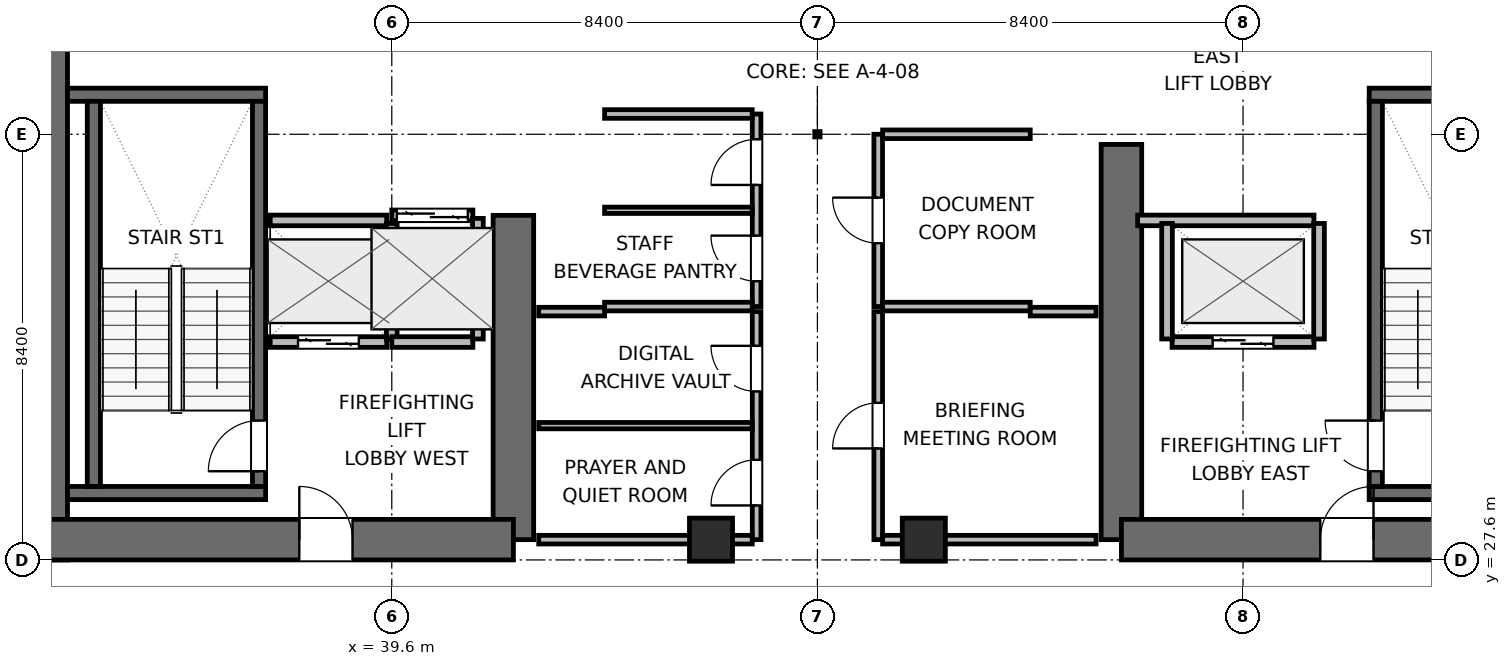
"""IFC4 building model, lengths in metres.
Left out: names, types, materials, properties, quantities, classifications, styles, units other than length and angle.
Written with IfcOpenShell. Run it as: python <this file> out.ifc"""

import sys

from ifc_helpers import new_model, si_unit, direction, frame, frame_2d, origin, origin_2d, place, context, subcontext, project, spatial, rectangle, extrude, element, fill, save


model = new_model("IFC4")
c1 = context("Model", 3, precision=1e-05, world=origin(), true_north=direction((0.0, 1.0)))
c2 = subcontext(c1, "Body", "Model", "MODEL_VIEW")
j1 = project(units=[si_unit("LENGTHUNIT", "METRE"), si_unit("PLANEANGLEUNIT", "RADIAN")], contexts=[c1])
p1 = place(None, origin())
s1 = spatial("IfcSite", under=j1, at=p1, CompositionType="ELEMENT")
p2 = place(p1, origin())
s2 = spatial("IfcBuilding", under=s1, at=p2, CompositionType="ELEMENT")
p3 = place(p2, frame((0.0, 0.0, 133.8)))
s3 = spatial("IfcBuildingStorey", under=s2, at=p3, CompositionType="ELEMENT", Elevation=133.8)
p4 = place(p3, frame((32.8, 27.6, 0.0), z_axis=(0.0, 0.0, 1.0), x_axis=(0.0, 1.0, 0.0)))
e1 = element("IfcWall", 1, at=p4, inside=s3, PredefinedType="SHEAR", context=c2, shape_type="SweptSolid", body=[
    extrude(rectangle(XDim=16.8, YDim=0.8, at=frame_2d((8.4, 0.0))), origin(), (0.0, 0.0, 1.0), 3.9),
])
p5 = place(p3, frame((42.0, 28.0, 0.0), z_axis=(0.0, 0.0, 1.0), x_axis=(0.0, 1.0, 0.0)))
e2 = element("IfcWall", 2, at=p5, inside=s3, PredefinedType="SHEAR", context=c2, shape_type="SweptSolid", body=[
    extrude(rectangle(XDim=6.4, YDim=0.8, at=frame_2d((3.2, 0.0))), origin(), (0.0, 0.0, 1.0), 3.9),
])
p6 = place(p3, frame((32.8, 28.0, 0.0), z_axis=(0.0, 0.0, 1.0), x_axis=(1.0, 0.0, 0.0)))
e3 = element("IfcWall", 3, at=p6, inside=s3, PredefinedType="SHEAR", context=c2, shape_type="SweptSolid", body=[
    extrude(rectangle(XDim=9.2, YDim=0.8, at=frame_2d((4.6, 0.0))), origin(), (0.0, 0.0, 1.0), 3.9),
])
p7 = place(p6, frame((4.975, 0.0, 0.0)))
e4 = element("IfcOpeningElement", 4, at=p7, cuts=e3, PredefinedType="OPENING", context=c2, shape_type="SweptSolid", body=[
    extrude(rectangle(XDim=1.05, YDim=2.04, at=frame_2d((0.525, 1.02))), frame((0.0, 0.41, 0.0), z_axis=(0.0, -1.0, 0.0), x_axis=(1.0, 0.0, 0.0)), (0.0, 0.0, 1.0), 0.82),
])
p8 = place(p3, frame((54.0, 28.0, 0.0), z_axis=(0.0, 0.0, 1.0), x_axis=(0.0, 1.0, 0.0)))
e5 = element("IfcWall", 5, at=p8, inside=s3, PredefinedType="SHEAR", context=c2, shape_type="SweptSolid", body=[
    extrude(rectangle(XDim=7.8, YDim=0.8, at=frame_2d((3.9, 0.0))), origin(), (0.0, 0.0, 1.0), 3.9),
])
p9 = place(p3, frame((54.0, 28.0, 0.0), z_axis=(0.0, 0.0, 1.0), x_axis=(1.0, 0.0, 0.0)))
e6 = element("IfcWall", 6, at=p9, inside=s3, PredefinedType="SHEAR", context=c2, shape_type="SweptSolid", body=[
    extrude(rectangle(XDim=9.2, YDim=0.8, at=frame_2d((4.6, 0.0))), origin(), (0.0, 0.0, 1.0), 3.9),
])
p10 = place(p9, frame((3.925, 0.0, 0.0)))
e7 = element("IfcOpeningElement", 7, at=p10, cuts=e6, PredefinedType="OPENING", context=c2, shape_type="SweptSolid", body=[
    extrude(rectangle(XDim=1.05, YDim=2.04, at=frame_2d((0.525, 1.02))), frame((0.0, 0.41, 0.0), z_axis=(0.0, -1.0, 0.0), x_axis=(1.0, 0.0, 0.0)), (0.0, 0.0, 1.0), 0.82),
])
for number, where, z_axis, x_axis in (
    (8, (33.2, 28.92, 0.0), (0.0, 0.0, 1.0), (1.0, 0.0, 0.0)),
    (9, (33.2, 36.78, 0.0), (0.0, 0.0, 1.0), (1.0, 0.0, 0.0)),
):
    element("IfcWall", number, at=place(p3, frame(where, z_axis=z_axis, x_axis=x_axis)), inside=s3, PredefinedType="SHEAR", context=c2, shape_type="SweptSolid", body=[
        extrude(rectangle(XDim=3.91, YDim=0.26, at=frame_2d((1.955, 0.0))), origin(), (0.0, 0.0, 1.0), 3.9),
    ])
p11 = place(p3, frame((33.72, 29.05, 0.0), z_axis=(0.0, 0.0, 1.0), x_axis=(0.0, 1.0, 0.0)))
e10 = element("IfcWall", 10, at=p11, inside=s3, PredefinedType="SHEAR", context=c2, shape_type="SweptSolid", body=[
    extrude(rectangle(XDim=7.6, YDim=0.26, at=frame_2d((3.8, 0.0))), origin(), (0.0, 0.0, 1.0), 3.9),
])
p12 = place(p3, frame((36.98, 29.05, 0.0), z_axis=(0.0, 0.0, 1.0), x_axis=(0.0, 1.0, 0.0)))
e11 = element("IfcWall", 11, at=p12, inside=s3, PredefinedType="SHEAR", context=c2, shape_type="SweptSolid", body=[
    extrude(rectangle(XDim=7.6, YDim=0.26, at=frame_2d((3.8, 0.0))), origin(), (0.0, 0.0, 1.0), 3.9),
])
p13 = place(p12, frame((0.3, 0.0, 0.0)))
e12 = element("IfcOpeningElement", 12, at=p13, cuts=e11, PredefinedType="OPENING", context=c2, shape_type="SweptSolid", body=[
    extrude(rectangle(XDim=1.0, YDim=2.04, at=frame_2d((0.5, 1.02))), frame((0.0, 0.14, 0.0), z_axis=(0.0, -1.0, 0.0), x_axis=(1.0, 0.0, 0.0)), (0.0, 0.0, 1.0), 0.28),
])
for number, where, z_axis, x_axis in (
    (13, (58.89, 28.92, 0.0), (0.0, 0.0, 1.0), (1.0, 0.0, 0.0)),
    (14, (58.89, 36.78, 0.0), (0.0, 0.0, 1.0), (1.0, 0.0, 0.0)),
):
    element("IfcWall", number, at=place(p3, frame(where, z_axis=z_axis, x_axis=x_axis)), inside=s3, PredefinedType="SHEAR", context=c2, shape_type="SweptSolid", body=[
        extrude(rectangle(XDim=3.91, YDim=0.26, at=frame_2d((1.955, 0.0))), origin(), (0.0, 0.0, 1.0), 3.9),
    ])
p14 = place(p3, frame((59.02, 29.05, 0.0), z_axis=(0.0, 0.0, 1.0), x_axis=(0.0, 1.0, 0.0)))
e15 = element("IfcWall", 15, at=p14, inside=s3, PredefinedType="SHEAR", context=c2, shape_type="SweptSolid", body=[
    extrude(rectangle(XDim=7.6, YDim=0.26, at=frame_2d((3.8, 0.0))), origin(), (0.0, 0.0, 1.0), 3.9),
])
p15 = place(p14, frame((0.3, 0.0, 0.0)))
e16 = element("IfcOpeningElement", 16, at=p15, cuts=e15, PredefinedType="OPENING", context=c2, shape_type="SweptSolid", body=[
    extrude(rectangle(XDim=1.0, YDim=2.04, at=frame_2d((0.5, 1.02))), frame((0.0, 0.14, 0.0), z_axis=(0.0, -1.0, 0.0), x_axis=(1.0, 0.0, 0.0)), (0.0, 0.0, 1.0), 0.28),
])
for number, where, z_axis, x_axis in (
    (17, (45.9, 28.0, 0.0), (0.0, 0.0, 1.0), (1.0, 0.0, 0.0)),
    (18, (50.1, 28.0, 0.0), (0.0, 0.0, 1.0), (1.0, 0.0, 0.0)),
):
    element("IfcColumn", number, at=place(p3, frame(where, z_axis=z_axis, x_axis=x_axis)), inside=s3, PredefinedType="COLUMN", context=c2, shape_type="SweptSolid", body=[
        extrude(rectangle(XDim=0.85, YDim=0.85, at=origin_2d()), origin(), (0.0, 0.0, 1.0), 3.9),
    ])
p16 = place(p3, frame((37.2, 31.9, 0.0), z_axis=(0.0, 0.0, 1.0), x_axis=(1.0, 0.0, 0.0)))
e19 = element("IfcWall", 19, at=p16, inside=s3, PredefinedType="PARTITIONING", context=c2, shape_type="SweptSolid", body=[
    extrude(rectangle(XDim=2.3, YDim=0.21, at=frame_2d((1.15, 0.0))), origin(), (0.0, 0.0, 1.0), 3.64),
])
p17 = place(p16, frame((0.55, 0.0, 0.0)))
e20 = element("IfcOpeningElement", 20, at=p17, cuts=e19, PredefinedType="OPENING", context=c2, shape_type="SweptSolid", body=[
    extrude(rectangle(XDim=1.2, YDim=2.04, at=frame_2d((0.6, 1.02))), frame((0.0, 0.115, 0.0), z_axis=(0.0, -1.0, 0.0), x_axis=(1.0, 0.0, 0.0)), (0.0, 0.0, 1.0), 0.23),
])
p18 = place(p3, frame((37.2, 34.3, 0.0), z_axis=(0.0, 0.0, 1.0), x_axis=(1.0, 0.0, 0.0)))
e21 = element("IfcWall", 21, at=p18, inside=s3, PredefinedType="PARTITIONING", context=c2, shape_type="SweptSolid", body=[
    extrude(rectangle(XDim=2.3, YDim=0.21, at=frame_2d((1.15, 0.0))), origin(), (0.0, 0.0, 1.0), 3.64),
])
p19 = place(p3, frame((39.6, 31.96, 0.0), z_axis=(0.0, 0.0, 1.0), x_axis=(0.0, 1.0, 0.0)))
e22 = element("IfcWall", 22, at=p19, inside=s3, PredefinedType="PARTITIONING", context=c2, shape_type="SweptSolid", body=[
    extrude(rectangle(XDim=2.28, YDim=0.21, at=frame_2d((1.14, 0.0))), origin(), (0.0, 0.0, 1.0), 3.64),
])
p20 = place(p3, frame((55.0, 31.9, 0.0), z_axis=(0.0, 0.0, 1.0), x_axis=(1.0, 0.0, 0.0)))
e23 = element("IfcWall", 23, at=p20, inside=s3, PredefinedType="PARTITIONING", context=c2, shape_type="SweptSolid", body=[
    extrude(rectangle(XDim=2.8, YDim=0.21, at=frame_2d((1.4, 0.0))), origin(), (0.0, 0.0, 1.0), 3.64),
])
p21 = place(p20, frame((0.8, 0.0, 0.0)))
e24 = element("IfcOpeningElement", 24, at=p21, cuts=e23, PredefinedType="OPENING", context=c2, shape_type="SweptSolid", body=[
    extrude(rectangle(XDim=1.2, YDim=2.04, at=frame_2d((0.6, 1.02))), frame((0.0, 0.115, 0.0), z_axis=(0.0, -1.0, 0.0), x_axis=(1.0, 0.0, 0.0)), (0.0, 0.0, 1.0), 0.23),
])
p22 = place(p3, frame((54.32, 34.3, 0.0), z_axis=(0.0, 0.0, 1.0), x_axis=(1.0, 0.0, 0.0)))
e25 = element("IfcWall", 25, at=p22, inside=s3, PredefinedType="PARTITIONING", context=c2, shape_type="SweptSolid", body=[
    extrude(rectangle(XDim=3.48, YDim=0.21, at=frame_2d((1.74, 0.0))), origin(), (0.0, 0.0, 1.0), 3.64),
])
for number, where, z_axis, x_axis in (
    (26, (54.9, 31.96, 0.0), (0.0, 0.0, 1.0), (0.0, 1.0, 0.0)),
    (27, (57.9, 31.96, 0.0), (0.0, 0.0, 1.0), (0.0, 1.0, 0.0)),
):
    element("IfcWall", number, at=place(p3, frame(where, z_axis=z_axis, x_axis=x_axis)), inside=s3, PredefinedType="PARTITIONING", context=c2, shape_type="SweptSolid", body=[
        extrude(rectangle(XDim=2.28, YDim=0.21, at=frame_2d((1.14, 0.0))), origin(), (0.0, 0.0, 1.0), 3.64),
    ])
p23 = place(p3, frame((39.6, 34.4, 0.0), z_axis=(0.0, 0.0, 1.0), x_axis=(1.0, 0.0, 0.0)))
e28 = element("IfcWall", 28, at=p23, inside=s3, PredefinedType="PARTITIONING", context=c2, shape_type="SweptSolid", body=[
    extrude(rectangle(XDim=1.6, YDim=0.21, at=frame_2d((0.8, 0.0))), origin(), (0.0, 0.0, 1.0), 3.64),
])
p24 = place(p23, frame((0.1, 0.0, 0.0)))
e29 = element("IfcOpeningElement", 29, at=p24, cuts=e28, PredefinedType="OPENING", context=c2, shape_type="SweptSolid", body=[
    extrude(rectangle(XDim=1.4, YDim=2.06, at=frame_2d((0.7, 1.03))), frame((0.0, 0.115, 0.0), z_axis=(0.0, -1.0, 0.0), x_axis=(1.0, 0.0, 0.0)), (0.0, 0.0, 1.0), 0.23),
])
p25 = place(p3, frame((39.6, 31.9, 0.0), z_axis=(0.0, 0.0, 1.0), x_axis=(1.0, 0.0, 0.0)))
e30 = element("IfcWall", 30, at=p25, inside=s3, PredefinedType="PARTITIONING", context=c2, shape_type="SweptSolid", body=[
    extrude(rectangle(XDim=1.6, YDim=0.21, at=frame_2d((0.8, 0.0))), origin(), (0.0, 0.0, 1.0), 3.64),
])
p26 = place(p3, frame((41.3, 31.96, 0.0), z_axis=(0.0, 0.0, 1.0), x_axis=(0.0, 1.0, 0.0)))
e31 = element("IfcWall", 31, at=p26, inside=s3, PredefinedType="PARTITIONING", context=c2, shape_type="SweptSolid", body=[
    extrude(rectangle(XDim=2.38, YDim=0.21, at=frame_2d((1.19, 0.0))), origin(), (0.0, 0.0, 1.0), 3.64),
])
p27 = place(p3, frame((46.8, 32.6, 0.0), z_axis=(0.0, 0.0, 1.0), x_axis=(0.0, 1.0, 0.0)))
e32 = element("IfcWall", 32, at=p27, inside=s3, PredefinedType="PARTITIONING", context=c2, shape_type="SweptSolid", body=[
    extrude(rectangle(XDim=3.8, YDim=0.17, at=frame_2d((1.9, 0.0))), origin(), (0.0, 0.0, 1.0), 3.64),
])
p28 = place(p27, frame((0.5, 0.0, 0.0)))
e33 = element("IfcOpeningElement", 33, at=p28, cuts=e32, PredefinedType="OPENING", context=c2, shape_type="SweptSolid", body=[
    extrude(rectangle(XDim=0.9, YDim=2.02, at=frame_2d((0.45, 1.01))), frame((0.0, 0.095, 0.0), z_axis=(0.0, -1.0, 0.0), x_axis=(1.0, 0.0, 0.0)), (0.0, 0.0, 1.0), 0.19),
])
p29 = place(p27, frame((2.4, 0.0, 0.0)))
e34 = element("IfcOpeningElement", 34, at=p29, cuts=e32, PredefinedType="OPENING", context=c2, shape_type="SweptSolid", body=[
    extrude(rectangle(XDim=0.9, YDim=2.02, at=frame_2d((0.45, 1.01))), frame((0.0, 0.095, 0.0), z_axis=(0.0, -1.0, 0.0), x_axis=(1.0, 0.0, 0.0)), (0.0, 0.0, 1.0), 0.19),
])
for number, where, z_axis, x_axis in (
    (35, (43.8, 32.6, 0.0), (0.0, 0.0, 1.0), (1.0, 0.0, 0.0)),
    (36, (43.8, 36.4, 0.0), (0.0, 0.0, 1.0), (1.0, 0.0, 0.0)),
):
    element("IfcWall", number, at=place(p3, frame(where, z_axis=z_axis, x_axis=x_axis)), inside=s3, PredefinedType="PARTITIONING", context=c2, shape_type="SweptSolid", body=[
        extrude(rectangle(XDim=2.913, YDim=0.17, at=frame_2d((1.457, 0.0))), origin(), (0.0, 0.0, 1.0), 3.64),
    ])
p30 = place(p3, frame((43.8, 34.5, 0.0), z_axis=(0.0, 0.0, 1.0), x_axis=(1.0, 0.0, 0.0)))
e37 = element("IfcWall", 37, at=p30, inside=s3, PredefinedType="PARTITIONING", context=c2, shape_type="SweptSolid", body=[
    extrude(rectangle(XDim=2.913, YDim=0.125, at=frame_2d((1.457, 0.0))), origin(), (0.0, 0.0, 1.0), 3.64),
])
p31 = place(p3, frame((49.2, 32.6, 0.0), z_axis=(0.0, 0.0, 1.0), x_axis=(0.0, 1.0, 0.0)))
e38 = element("IfcWall", 38, at=p31, inside=s3, PredefinedType="PARTITIONING", context=c2, shape_type="SweptSolid", body=[
    extrude(rectangle(XDim=3.4, YDim=0.17, at=frame_2d((1.7, 0.0))), origin(), (0.0, 0.0, 1.0), 3.64),
])
p32 = place(p31, frame((1.25, 0.0, 0.0)))
e39 = element("IfcOpeningElement", 39, at=p32, cuts=e38, PredefinedType="OPENING", context=c2, shape_type="SweptSolid", body=[
    extrude(rectangle(XDim=0.9, YDim=2.02, at=frame_2d((0.45, 1.01))), frame((0.0, 0.095, 0.0), z_axis=(0.0, -1.0, 0.0), x_axis=(1.0, 0.0, 0.0)), (0.0, 0.0, 1.0), 0.19),
])
for number, where, z_axis, x_axis in (
    (40, (49.287, 32.6, 0.0), (0.0, 0.0, 1.0), (1.0, 0.0, 0.0)),
    (41, (49.287, 36.0, 0.0), (0.0, 0.0, 1.0), (1.0, 0.0, 0.0)),
):
    element("IfcWall", number, at=place(p3, frame(where, z_axis=z_axis, x_axis=x_axis)), inside=s3, PredefinedType="PARTITIONING", context=c2, shape_type="SweptSolid", body=[
        extrude(rectangle(XDim=2.913, YDim=0.17, at=frame_2d((1.457, 0.0))), origin(), (0.0, 0.0, 1.0), 3.64),
    ])
p33 = place(p3, frame((46.8, 28.0, 0.0), z_axis=(0.0, 0.0, 1.0), x_axis=(0.0, 1.0, 0.0)))
e42 = element("IfcWall", 42, at=p33, inside=s3, PredefinedType="PARTITIONING", context=c2, shape_type="SweptSolid", body=[
    extrude(rectangle(XDim=4.5, YDim=0.17, at=frame_2d((2.25, 0.0))), origin(), (0.0, 0.0, 1.0), 3.64),
])
p34 = place(p33, frame((0.675, 0.0, 0.0)))
e43 = element("IfcOpeningElement", 43, at=p34, cuts=e42, PredefinedType="OPENING", context=c2, shape_type="SweptSolid", body=[
    extrude(rectangle(XDim=0.9, YDim=2.02, at=frame_2d((0.45, 1.01))), frame((0.0, 0.095, 0.0), z_axis=(0.0, -1.0, 0.0), x_axis=(1.0, 0.0, 0.0)), (0.0, 0.0, 1.0), 0.19),
])
p35 = place(p33, frame((2.925, 0.0, 0.0)))
e44 = element("IfcOpeningElement", 44, at=p35, cuts=e42, PredefinedType="OPENING", context=c2, shape_type="SweptSolid", body=[
    extrude(rectangle(XDim=0.9, YDim=2.02, at=frame_2d((0.45, 1.01))), frame((0.0, 0.095, 0.0), z_axis=(0.0, -1.0, 0.0), x_axis=(1.0, 0.0, 0.0)), (0.0, 0.0, 1.0), 0.19),
])
p36 = place(p3, frame((42.5, 28.0, 0.0), z_axis=(0.0, 0.0, 1.0), x_axis=(1.0, 0.0, 0.0)))
e45 = element("IfcWall", 45, at=p36, inside=s3, PredefinedType="PARTITIONING", context=c2, shape_type="SweptSolid", body=[
    extrude(rectangle(XDim=4.213, YDim=0.17, at=frame_2d((2.106, 0.0))), origin(), (0.0, 0.0, 1.0), 2.525),
])
p37 = place(p3, frame((42.5, 32.5, 0.0), z_axis=(0.0, 0.0, 1.0), x_axis=(1.0, 0.0, 0.0)))
e46 = element("IfcWall", 46, at=p37, inside=s3, PredefinedType="PARTITIONING", context=c2, shape_type="SweptSolid", body=[
    extrude(rectangle(XDim=1.3, YDim=0.17, at=frame_2d((0.65, 0.0))), origin(), (0.0, 0.0, 1.0), 3.64),
])
p38 = place(p3, frame((42.5, 30.25, 0.0), z_axis=(0.0, 0.0, 1.0), x_axis=(1.0, 0.0, 0.0)))
e47 = element("IfcWall", 47, at=p38, inside=s3, PredefinedType="PARTITIONING", context=c2, shape_type="SweptSolid", body=[
    extrude(rectangle(XDim=4.213, YDim=0.125, at=frame_2d((2.106, 0.0))), origin(), (0.0, 0.0, 1.0), 3.64),
])
p39 = place(p3, frame((49.2, 28.0, 0.0), z_axis=(0.0, 0.0, 1.0), x_axis=(0.0, 1.0, 0.0)))
e48 = element("IfcWall", 48, at=p39, inside=s3, PredefinedType="PARTITIONING", context=c2, shape_type="SweptSolid", body=[
    extrude(rectangle(XDim=4.5, YDim=0.17, at=frame_2d((2.25, 0.0))), origin(), (0.0, 0.0, 1.0), 3.64),
])
p40 = place(p39, frame((1.8, 0.0, 0.0)))
e49 = element("IfcOpeningElement", 49, at=p40, cuts=e48, PredefinedType="OPENING", context=c2, shape_type="SweptSolid", body=[
    extrude(rectangle(XDim=0.9, YDim=2.02, at=frame_2d((0.45, 1.01))), frame((0.0, 0.095, 0.0), z_axis=(0.0, -1.0, 0.0), x_axis=(1.0, 0.0, 0.0)), (0.0, 0.0, 1.0), 0.19),
])
p41 = place(p3, frame((49.287, 28.0, 0.0), z_axis=(0.0, 0.0, 1.0), x_axis=(1.0, 0.0, 0.0)))
e50 = element("IfcWall", 50, at=p41, inside=s3, PredefinedType="PARTITIONING", context=c2, shape_type="SweptSolid", body=[
    extrude(rectangle(XDim=4.213, YDim=0.17, at=frame_2d((2.106, 0.0))), origin(), (0.0, 0.0, 1.0), 2.525),
])
p42 = place(p3, frame((52.2, 32.5, 0.0), z_axis=(0.0, 0.0, 1.0), x_axis=(1.0, 0.0, 0.0)))
e51 = element("IfcWall", 51, at=p42, inside=s3, PredefinedType="PARTITIONING", context=c2, shape_type="SweptSolid", body=[
    extrude(rectangle(XDim=1.3, YDim=0.17, at=frame_2d((0.65, 0.0))), origin(), (0.0, 0.0, 1.0), 3.64),
])
p43 = place(p13, origin())
e52 = element("IfcDoor", 52, at=p43, inside=s3, OperationType="SINGLE_SWING_LEFT", PredefinedType="DOOR", context=c2, shape_type="SweptSolid", body=[
    extrude(rectangle(XDim=1.0, YDim=2.04, at=frame_2d((0.5, 1.02))), frame((0.0, 0.025, 0.0), z_axis=(0.0, -1.0, 0.0), x_axis=(1.0, 0.0, 0.0)), (0.0, 0.0, 1.0), 0.05),
])
fill(e12, e52)
p44 = place(p15, origin())
e53 = element("IfcDoor", 53, at=p44, inside=s3, OperationType="SINGLE_SWING_RIGHT", PredefinedType="DOOR", context=c2, shape_type="SweptSolid", body=[
    extrude(rectangle(XDim=1.0, YDim=2.04, at=frame_2d((0.5, 1.02))), frame((0.0, 0.025, 0.0), z_axis=(0.0, -1.0, 0.0), x_axis=(1.0, 0.0, 0.0)), (0.0, 0.0, 1.0), 0.05),
])
fill(e16, e53)
p45 = place(p17, origin())
e54 = element("IfcDoor", 54, at=p45, inside=s3, OperationType="DOUBLE_DOOR_SLIDING", PredefinedType="DOOR", context=c2, shape_type="SweptSolid", body=[
    extrude(rectangle(XDim=1.2, YDim=2.04, at=frame_2d((0.6, 1.02))), frame((0.0, 0.025, 0.0), z_axis=(0.0, -1.0, 0.0), x_axis=(1.0, 0.0, 0.0)), (0.0, 0.0, 1.0), 0.05),
])
fill(e20, e54)
p46 = place(p21, origin())
e55 = element("IfcDoor", 55, at=p46, inside=s3, OperationType="DOUBLE_DOOR_SLIDING", PredefinedType="DOOR", context=c2, shape_type="SweptSolid", body=[
    extrude(rectangle(XDim=1.2, YDim=2.04, at=frame_2d((0.6, 1.02))), frame((0.0, 0.025, 0.0), z_axis=(0.0, -1.0, 0.0), x_axis=(1.0, 0.0, 0.0)), (0.0, 0.0, 1.0), 0.05),
])
fill(e24, e55)
p47 = place(p24, origin())
e56 = element("IfcDoor", 56, at=p47, inside=s3, OperationType="DOUBLE_DOOR_SLIDING", PredefinedType="DOOR", context=c2, shape_type="SweptSolid", body=[
    extrude(rectangle(XDim=1.4, YDim=2.06, at=frame_2d((0.7, 1.03))), frame((0.0, 0.025, 0.0), z_axis=(0.0, -1.0, 0.0), x_axis=(1.0, 0.0, 0.0)), (0.0, 0.0, 1.0), 0.05),
])
fill(e29, e56)
p48 = place(p7, origin())
e57 = element("IfcDoor", 57, at=p48, inside=s3, OperationType="SINGLE_SWING_LEFT", PredefinedType="DOOR", context=c2, shape_type="SweptSolid", body=[
    extrude(rectangle(XDim=1.05, YDim=2.04, at=frame_2d((0.525, 1.02))), frame((0.0, 0.025, 0.0), z_axis=(0.0, -1.0, 0.0), x_axis=(1.0, 0.0, 0.0)), (0.0, 0.0, 1.0), 0.05),
])
fill(e4, e57)
p49 = place(p10, origin())
e58 = element("IfcDoor", 58, at=p49, inside=s3, OperationType="SINGLE_SWING_RIGHT", PredefinedType="DOOR", context=c2, shape_type="SweptSolid", body=[
    extrude(rectangle(XDim=1.05, YDim=2.04, at=frame_2d((0.525, 1.02))), frame((0.0, 0.025, 0.0), z_axis=(0.0, -1.0, 0.0), x_axis=(1.0, 0.0, 0.0)), (0.0, 0.0, 1.0), 0.05),
])
fill(e7, e58)
p50 = place(p28, origin())
e59 = element("IfcDoor", 59, at=p50, inside=s3, OperationType="SINGLE_SWING_RIGHT", PredefinedType="DOOR", context=c2, shape_type="SweptSolid", body=[
    extrude(rectangle(XDim=0.9, YDim=2.02, at=frame_2d((0.45, 1.01))), frame((0.0, 0.025, 0.0), z_axis=(0.0, -1.0, 0.0), x_axis=(1.0, 0.0, 0.0)), (0.0, 0.0, 1.0), 0.05),
])
fill(e33, e59)
p51 = place(p29, origin())
e60 = element("IfcDoor", 60, at=p51, inside=s3, OperationType="SINGLE_SWING_LEFT", PredefinedType="DOOR", context=c2, shape_type="SweptSolid", body=[
    extrude(rectangle(XDim=0.9, YDim=2.02, at=frame_2d((0.45, 1.01))), frame((0.0, 0.025, 0.0), z_axis=(0.0, -1.0, 0.0), x_axis=(1.0, 0.0, 0.0)), (0.0, 0.0, 1.0), 0.05),
])
fill(e34, e60)
p52 = place(p32, origin())
e61 = element("IfcDoor", 61, at=p52, inside=s3, OperationType="SINGLE_SWING_RIGHT", PredefinedType="DOOR", context=c2, shape_type="SweptSolid", body=[
    extrude(rectangle(XDim=0.9, YDim=2.02, at=frame_2d((0.45, 1.01))), frame((0.0, 0.025, 0.0), z_axis=(0.0, -1.0, 0.0), x_axis=(1.0, 0.0, 0.0)), (0.0, 0.0, 1.0), 0.05),
])
fill(e39, e61)
p53 = place(p34, origin())
e62 = element("IfcDoor", 62, at=p53, inside=s3, OperationType="SINGLE_SWING_LEFT", PredefinedType="DOOR", context=c2, shape_type="SweptSolid", body=[
    extrude(rectangle(XDim=0.9, YDim=2.02, at=frame_2d((0.45, 1.01))), frame((0.0, 0.025, 0.0), z_axis=(0.0, -1.0, 0.0), x_axis=(1.0, 0.0, 0.0)), (0.0, 0.0, 1.0), 0.05),
])
fill(e43, e62)
p54 = place(p35, origin())
e63 = element("IfcDoor", 63, at=p54, inside=s3, OperationType="SINGLE_SWING_RIGHT", PredefinedType="DOOR", context=c2, shape_type="SweptSolid", body=[
    extrude(rectangle(XDim=0.9, YDim=2.02, at=frame_2d((0.45, 1.01))), frame((0.0, 0.025, 0.0), z_axis=(0.0, -1.0, 0.0), x_axis=(1.0, 0.0, 0.0)), (0.0, 0.0, 1.0), 0.05),
])
fill(e44, e63)
p55 = place(p40, origin())
e64 = element("IfcDoor", 64, at=p55, inside=s3, OperationType="SINGLE_SWING_LEFT", PredefinedType="DOOR", context=c2, shape_type="SweptSolid", body=[
    extrude(rectangle(XDim=0.9, YDim=2.02, at=frame_2d((0.45, 1.01))), frame((0.0, 0.025, 0.0), z_axis=(0.0, -1.0, 0.0), x_axis=(1.0, 0.0, 0.0)), (0.0, 0.0, 1.0), 0.05),
])
fill(e49, e64)
save(model, sys.argv[1])
